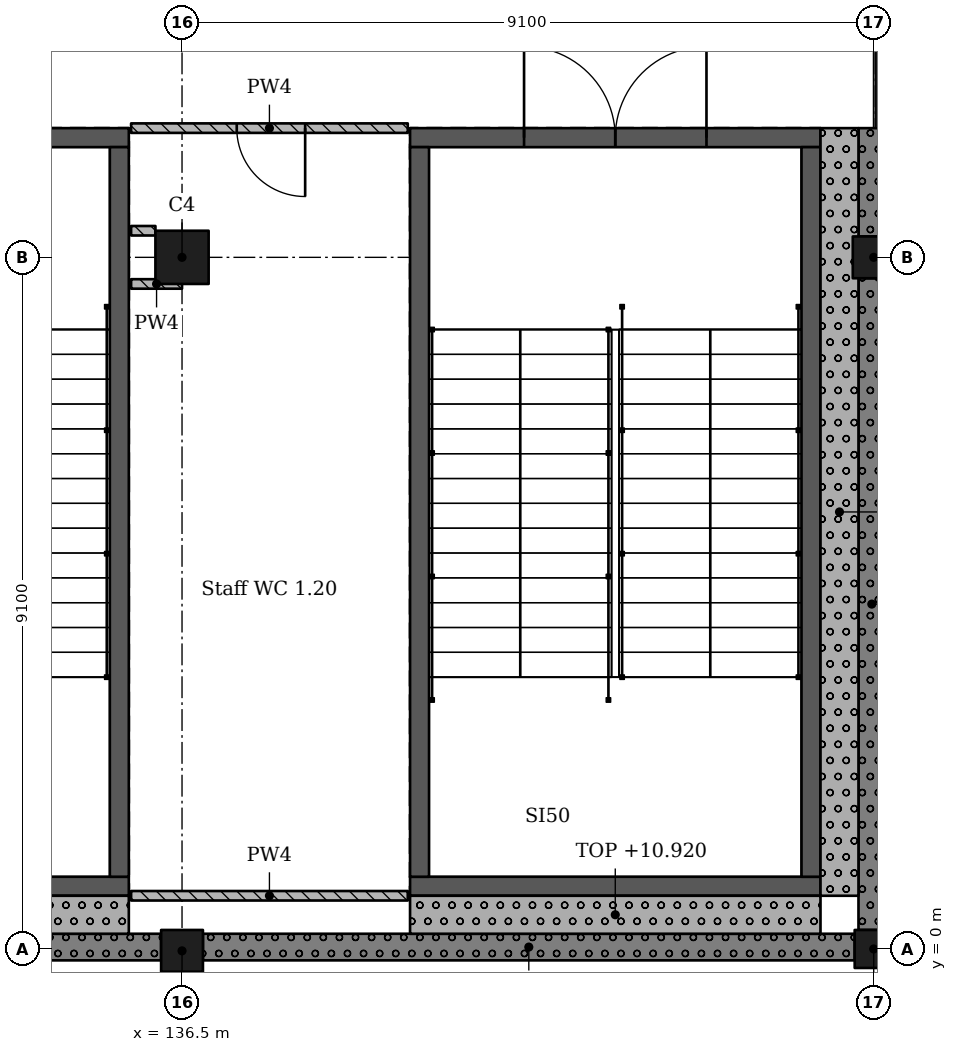
"""IFC4 building model, lengths in metres.
Left out: names, types, materials, properties, quantities, classifications, styles, units other than length and angle.
Written with IfcOpenShell. Run it as: python <this file> out.ifc"""

import sys

from ifc_helpers import new_model, si_unit, direction, frame, frame_2d, origin, origin_2d, place, context, subcontext, project, spatial, rectangle, extrude, element, fill, save


model = new_model("IFC4")
c1 = context("Model", 3, precision=1e-05, world=origin(), true_north=direction((0.0, 1.0)))
c2 = subcontext(c1, "Body", "Model", "MODEL_VIEW")
j1 = project(units=[si_unit("LENGTHUNIT", "METRE"), si_unit("PLANEANGLEUNIT", "RADIAN")], contexts=[c1])
p1 = place(None, origin())
s1 = spatial("IfcSite", under=j1, at=p1, CompositionType="ELEMENT")
p2 = place(p1, origin())
s2 = spatial("IfcBuilding", under=s1, at=p2, CompositionType="ELEMENT")
p3 = place(p2, frame((0.0, 0.0, 6.37)))
s3 = spatial("IfcBuildingStorey", under=s2, at=p3, CompositionType="ELEMENT", Elevation=6.37)
p4 = place(p3, frame((136.5, -0.025, 0.0), z_axis=(0.0, 0.0, 1.0), x_axis=(1.0, 0.0, 0.0)))
e1 = element("IfcColumn", 1, at=p4, inside=s3, PredefinedType="COLUMN", context=c2, shape_type="SweptSolid", body=[
    extrude(rectangle(XDim=0.55, YDim=0.55, at=origin_2d()), origin(), (0.0, 0.0, 1.0), 4.55),
])
p5 = place(p3, frame((136.5, 9.1, 0.0), z_axis=(0.0, 0.0, 1.0), x_axis=(1.0, 0.0, 0.0)))
e2 = element("IfcColumn", 2, at=p5, inside=s3, PredefinedType="COLUMN", context=c2, shape_type="SweptSolid", body=[
    extrude(rectangle(XDim=0.7, YDim=0.7, at=origin_2d()), origin(), (0.0, 0.0, 1.0), 4.55),
])
p6 = place(p3, frame((145.6, 0.0, 0.0), z_axis=(0.0, 0.0, 1.0), x_axis=(1.0, 0.0, 0.0)))
e3 = element("IfcColumn", 3, at=p6, inside=s3, PredefinedType="COLUMN", context=c2, shape_type="SweptSolid", body=[
    extrude(rectangle(XDim=0.5, YDim=0.5, at=origin_2d()), origin(), (0.0, 0.0, 1.0), 4.55),
])
p7 = place(p3, frame((145.6, 9.1, 0.0), z_axis=(0.0, 0.0, 1.0), x_axis=(1.0, 0.0, 0.0)))
e4 = element("IfcColumn", 4, at=p7, inside=s3, PredefinedType="COLUMN", context=c2, shape_type="SweptSolid", body=[
    extrude(rectangle(XDim=0.55, YDim=0.55, at=origin_2d()), origin(), (0.0, 0.0, 1.0), 4.55),
])
p8 = place(p3, frame((144.9, 0.825, 0.0), z_axis=(0.0, 0.0, 1.0), x_axis=(-1.0, 0.0, 0.0)))
e5 = element("IfcWall", 5, at=p8, inside=s3, PredefinedType="SHEAR", context=c2, shape_type="SweptSolid", body=[
    extrude(rectangle(XDim=5.4, YDim=0.25, at=frame_2d((2.7, 0.0))), origin(), (0.0, 0.0, 1.0), 4.55),
])
p9 = place(p3, frame((144.9, 10.675, 0.0), z_axis=(0.0, 0.0, 1.0), x_axis=(-1.0, 0.0, 0.0)))
e6 = element("IfcWall", 6, at=p9, inside=s3, PredefinedType="SHEAR", context=c2, shape_type="SweptSolid", body=[
    extrude(rectangle(XDim=5.4, YDim=0.25, at=frame_2d((2.7, 0.0))), origin(), (0.0, 0.0, 1.0), 4.55),
])
p10 = place(p9, frame((1.5, 0.0, 0.0)))
e7 = element("IfcOpeningElement", 7, at=p10, cuts=e6, PredefinedType="OPENING", context=c2, shape_type="SweptSolid", body=[
    extrude(rectangle(XDim=2.4, YDim=2.1, at=frame_2d((1.2, 1.05))), frame((0.0, 0.135, 0.0), z_axis=(0.0, -1.0, 0.0), x_axis=(1.0, 0.0, 0.0)), (0.0, 0.0, 1.0), 0.27),
])
for number, where, z_axis, x_axis in (
    (8, (139.625, 10.55, 0.0), (0.0, 0.0, 1.0), (0.0, -1.0, 0.0)),
    (9, (144.775, 10.55, 0.0), (0.0, 0.0, 1.0), (0.0, -1.0, 0.0)),
):
    element("IfcWall", number, at=place(p3, frame(where, z_axis=z_axis, x_axis=x_axis)), inside=s3, PredefinedType="SHEAR", context=c2, shape_type="SweptSolid", body=[
        extrude(rectangle(XDim=9.6, YDim=0.25, at=frame_2d((4.8, 0.0))), origin(), (0.0, 0.0, 1.0), 4.55),
    ])
p11 = place(p3, frame((135.8, 0.825, 0.0), z_axis=(0.0, 0.0, 1.0), x_axis=(-1.0, 0.0, 0.0)))
e10 = element("IfcWall", 10, at=p11, inside=s3, PredefinedType="SHEAR", context=c2, shape_type="SweptSolid", body=[
    extrude(rectangle(XDim=5.4, YDim=0.25, at=frame_2d((2.7, 0.0))), origin(), (0.0, 0.0, 1.0), 4.55),
])
p12 = place(p3, frame((135.8, 10.675, 0.0), z_axis=(0.0, 0.0, 1.0), x_axis=(-1.0, 0.0, 0.0)))
e11 = element("IfcWall", 11, at=p12, inside=s3, PredefinedType="SHEAR", context=c2, shape_type="SweptSolid", body=[
    extrude(rectangle(XDim=5.4, YDim=0.25, at=frame_2d((2.7, 0.0))), origin(), (0.0, 0.0, 1.0), 4.55),
])
p13 = place(p12, frame((1.5, 0.0, 0.0)))
e12 = element("IfcOpeningElement", 12, at=p13, cuts=e11, PredefinedType="OPENING", context=c2, shape_type="SweptSolid", body=[
    extrude(rectangle(XDim=2.4, YDim=2.1, at=frame_2d((1.2, 1.05))), frame((0.0, 0.135, 0.0), z_axis=(0.0, -1.0, 0.0), x_axis=(1.0, 0.0, 0.0)), (0.0, 0.0, 1.0), 0.27),
])
p14 = place(p3, frame((135.675, 10.55, 0.0), z_axis=(0.0, 0.0, 1.0), x_axis=(0.0, -1.0, 0.0)))
e13 = element("IfcWall", 13, at=p14, inside=s3, PredefinedType="SHEAR", context=c2, shape_type="SweptSolid", body=[
    extrude(rectangle(XDim=9.6, YDim=0.25, at=frame_2d((4.8, 0.0))), origin(), (0.0, 0.0, 1.0), 4.55),
])
p15 = place(p3, frame((130.4, 0.025, 0.0), z_axis=(0.0, 0.0, 1.0), x_axis=(1.0, 0.0, 0.0)))
e14 = element("IfcWall", 14, at=p15, inside=s3, PredefinedType="SOLIDWALL", context=c2, shape_type="SweptSolid", body=[
    extrude(rectangle(XDim=5.825, YDim=0.35, at=frame_2d((2.913, 0.0))), origin(), (0.0, 0.0, 1.0), 3.5),
])
p16 = place(p3, frame((136.775, 0.025, 0.0), z_axis=(0.0, 0.0, 1.0), x_axis=(1.0, 0.0, 0.0)))
e15 = element("IfcWall", 15, at=p16, inside=s3, PredefinedType="SOLIDWALL", context=c2, shape_type="SweptSolid", body=[
    extrude(rectangle(XDim=8.575, YDim=0.35, at=frame_2d((4.288, 0.0))), origin(), (0.0, 0.0, 1.0), 3.5),
])
p17 = place(p3, frame((145.575, 0.25, 0.0), z_axis=(0.0, 0.0, 1.0), x_axis=(0.0, 1.0, 0.0)))
e16 = element("IfcWall", 16, at=p17, inside=s3, PredefinedType="SOLIDWALL", context=c2, shape_type="SweptSolid", body=[
    extrude(rectangle(XDim=8.575, YDim=0.35, at=frame_2d((4.288, 0.0))), origin(), (0.0, 0.0, 1.0), 3.5),
])
p18 = place(p3, frame((145.575, 9.375, 0.0), z_axis=(0.0, 0.0, 1.0), x_axis=(0.0, 1.0, 0.0)))
e17 = element("IfcWall", 17, at=p18, inside=s3, PredefinedType="SOLIDWALL", context=c2, shape_type="SweptSolid", body=[
    extrude(rectangle(XDim=1.425, YDim=0.35, at=frame_2d((0.712, 0.0))), origin(), (0.0, 0.0, 1.0), 3.5),
])
p19 = place(p3, frame((139.5, 0.45, 0.0), z_axis=(0.0, 0.0, 1.0), x_axis=(1.0, 0.0, 0.0)))
e18 = element("IfcWall", 18, at=p19, inside=s3, PredefinedType="SOLIDWALL", context=c2, shape_type="SweptSolid", body=[
    extrude(rectangle(XDim=5.4, YDim=0.5, at=frame_2d((2.7, 0.0))), origin(), (0.0, 0.0, 1.0), 4.55),
])
p20 = place(p3, frame((145.15, 0.7, 0.0), z_axis=(0.0, 0.0, 1.0), x_axis=(0.0, 1.0, 0.0)))
e19 = element("IfcWall", 19, at=p20, inside=s3, PredefinedType="SOLIDWALL", context=c2, shape_type="SweptSolid", body=[
    extrude(rectangle(XDim=10.1, YDim=0.5, at=frame_2d((5.05, 0.0))), origin(), (0.0, 0.0, 1.0), 4.55),
])
p21 = place(p3, frame((130.4, 0.45, 0.0), z_axis=(0.0, 0.0, 1.0), x_axis=(1.0, 0.0, 0.0)))
e20 = element("IfcWall", 20, at=p21, inside=s3, PredefinedType="SOLIDWALL", context=c2, shape_type="SweptSolid", body=[
    extrude(rectangle(XDim=5.4, YDim=0.5, at=frame_2d((2.7, 0.0))), origin(), (0.0, 0.0, 1.0), 4.55),
])
p22 = place(p3, frame((135.83, 8.75, 0.0), z_axis=(0.0, 0.0, 1.0), x_axis=(1.0, 0.0, 0.0)))
e21 = element("IfcWall", 21, at=p22, inside=s3, PredefinedType="PARTITIONING", context=c2, shape_type="SweptSolid", body=[
    extrude(rectangle(XDim=0.67, YDim=0.125, at=frame_2d((0.335, 0.0))), origin(), (0.0, 0.0, 1.0), 4.25),
])
p23 = place(p3, frame((136.15, 9.45, 0.0), z_axis=(0.0, 0.0, 1.0), x_axis=(-1.0, 0.0, 0.0)))
e22 = element("IfcWall", 22, at=p23, inside=s3, PredefinedType="PARTITIONING", context=c2, shape_type="SweptSolid", body=[
    extrude(rectangle(XDim=0.32, YDim=0.125, at=frame_2d((0.16, 0.0))), origin(), (0.0, 0.0, 1.0), 4.25),
])
p24 = place(p3, frame((139.47, 0.7, 0.0), z_axis=(0.0, 0.0, 1.0), x_axis=(-1.0, 0.0, 0.0)))
e23 = element("IfcWall", 23, at=p24, inside=s3, PredefinedType="PARTITIONING", context=c2, shape_type="SweptSolid", body=[
    extrude(rectangle(XDim=3.64, YDim=0.125, at=frame_2d((1.82, 0.0))), origin(), (0.0, 0.0, 1.0), 4.25),
])
p25 = place(p3, frame((139.47, 10.8, 0.0), z_axis=(0.0, 0.0, 1.0), x_axis=(-1.0, 0.0, 0.0)))
e24 = element("IfcWall", 24, at=p25, inside=s3, PredefinedType="PARTITIONING", context=c2, shape_type="SweptSolid", body=[
    extrude(rectangle(XDim=3.64, YDim=0.125, at=frame_2d((1.82, 0.0))), origin(), (0.0, 0.0, 1.0), 4.25),
])
p26 = place(p25, frame((1.35, 0.0, 0.0)))
e25 = element("IfcOpeningElement", 25, at=p26, cuts=e24, PredefinedType="OPENING", context=c2, shape_type="SweptSolid", body=[
    extrude(rectangle(XDim=0.9, YDim=2.1, at=frame_2d((0.45, 1.05))), frame((0.0, 0.073, 0.0), z_axis=(0.0, -1.0, 0.0), x_axis=(1.0, 0.0, 0.0)), (0.0, 0.0, 1.0), 0.145),
])
p27 = place(p26, origin())
e26 = element("IfcDoor", 26, at=p27, inside=s3, OperationType="SINGLE_SWING_RIGHT", PredefinedType="DOOR", context=c2, shape_type="SweptSolid", body=[
    extrude(rectangle(XDim=0.9, YDim=2.1, at=frame_2d((0.45, 1.05))), frame((0.0, 0.025, 0.0), z_axis=(0.0, -1.0, 0.0), x_axis=(1.0, 0.0, 0.0)), (0.0, 0.0, 1.0), 0.05),
])
fill(e25, e26)
p28 = place(p10, origin())
e27 = element("IfcDoor", 27, at=p28, inside=s3, OperationType="DOUBLE_DOOR_SINGLE_SWING", PredefinedType="DOOR", context=c2, shape_type="SweptSolid", body=[
    extrude(rectangle(XDim=2.4, YDim=2.1, at=frame_2d((1.2, 1.05))), frame((0.0, 0.025, 0.0), z_axis=(0.0, -1.0, 0.0), x_axis=(1.0, 0.0, 0.0)), (0.0, 0.0, 1.0), 0.05),
])
fill(e7, e27)
save(model, sys.argv[1])
